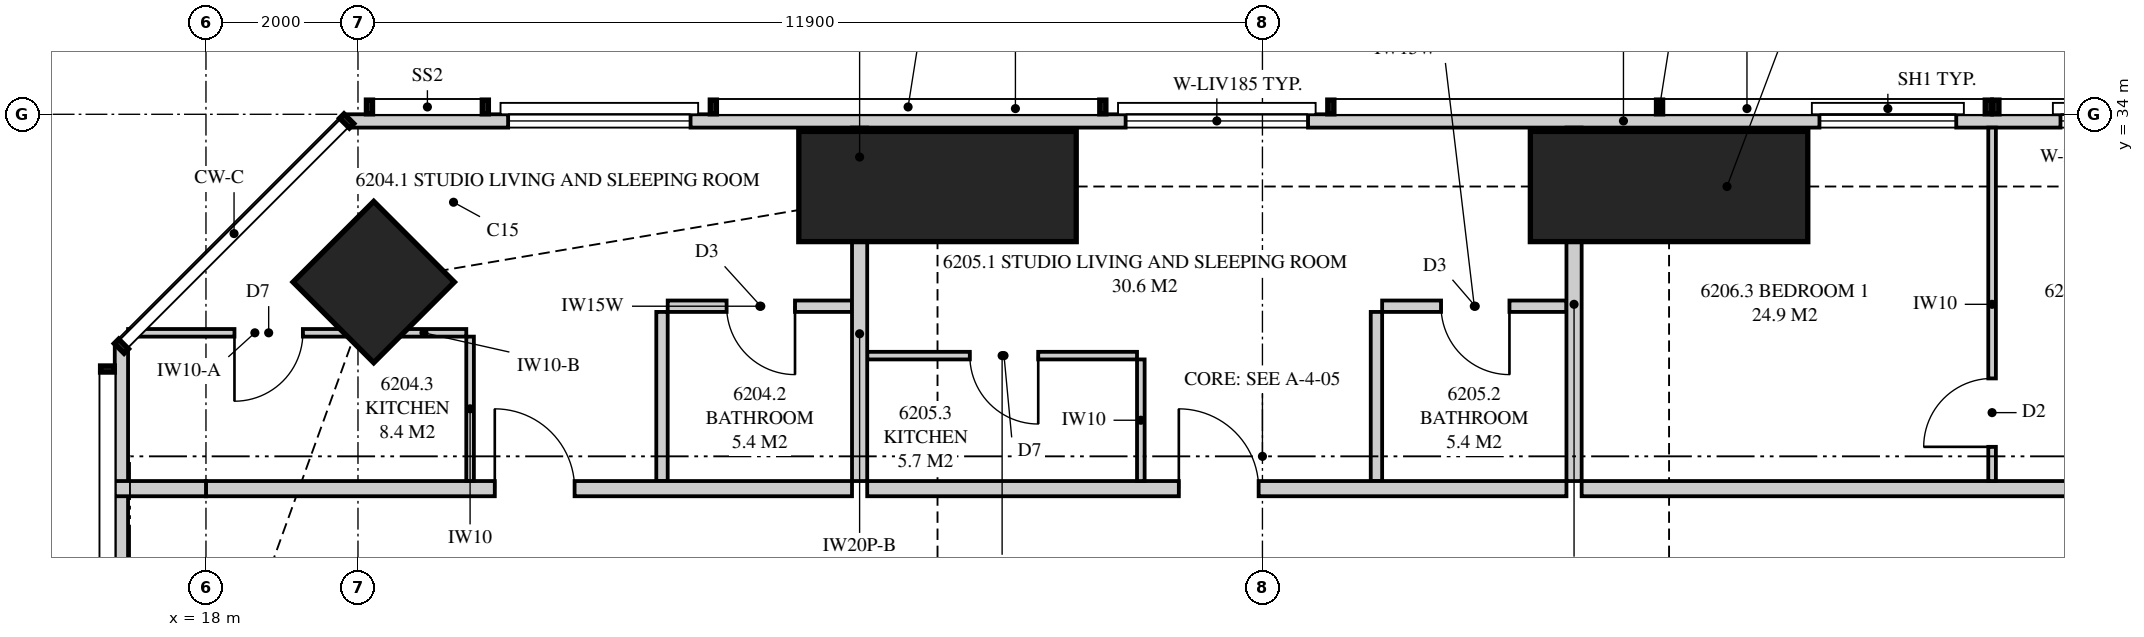
"""IFC4 building model, lengths in metres.
Left out: names, types, materials, properties, quantities, classifications, styles, units other than length and angle.
Written with IfcOpenShell. Run it as: python <this file> out.ifc"""

import sys

from ifc_helpers import new_model, si_unit, direction, frame, frame_2d, origin, origin_2d, place, context, subcontext, project, spatial, polyline, rectangle, outline, extrude, element, fill, save


model = new_model("IFC4")
c1 = context("Model", 3, precision=1e-05, world=origin(), true_north=direction((0.0, 1.0)))
c2 = subcontext(c1, "Body", "Model", "MODEL_VIEW")
j1 = project(units=[si_unit("LENGTHUNIT", "METRE"), si_unit("PLANEANGLEUNIT", "RADIAN")], contexts=[c1])
p1 = place(None, origin())
s1 = spatial("IfcSite", under=j1, at=p1, CompositionType="ELEMENT")
p2 = place(p1, origin())
s2 = spatial("IfcBuilding", under=s1, at=p2, CompositionType="ELEMENT")
p3 = place(p2, frame((0.0, 0.0, 228.45)))
s3 = spatial("IfcBuildingStorey", under=s2, at=p3, CompositionType="ELEMENT", Elevation=228.45)
for number, where, z_axis, x_axis in (
    (1, (37.25, 33.05, 0.0), (0.0, 0.0, 1.0), (0.0, 1.0, 0.0)),
    (2, (27.625, 33.05, 0.0), (0.0, 0.0, 1.0), (0.0, 1.0, 0.0)),
):
    element("IfcColumn", number, at=place(p3, frame(where, z_axis=z_axis, x_axis=x_axis)), inside=s3, PredefinedType="COLUMN", context=c2, shape_type="SweptSolid", body=[
        extrude(rectangle(XDim=1.45, YDim=3.65, at=origin_2d()), origin(), (0.0, 0.0, 1.0), 3.5),
    ])
p4 = place(p3, frame((20.207, 31.793, 0.0), z_axis=(0.0, 0.0, 1.0), x_axis=(0.707106781187, 0.707106781187, 0.0)))
e3 = element("IfcColumn", 3, at=p4, inside=s3, PredefinedType="COLUMN", context=c2, shape_type="SweptSolid", body=[
    extrude(rectangle(XDim=1.5, YDim=1.5, at=origin_2d()), origin(), (0.0, 0.0, 1.0), 3.5),
])
p5 = place(p3, frame((53.449, 33.913, 0.0), z_axis=(0.0, 0.0, 1.0), x_axis=(-1.0, 0.0, 0.0)))
e4 = element("IfcWall", 4, at=p5, inside=s3, PredefinedType="SOLIDWALL", context=c2, shape_type="SweptSolid", body=[
    extrude(outline(polyline([(0.0, 0.0), (33.597, 0.0), (33.597, 3.26), (26.039, 3.26), (26.039, 2.3), (25.955, 2.3), (25.955, 3.26), (25.824, 3.26), (25.824, 2.3), (6.574, 2.3), (6.574, 3.26), (6.442, 3.26), (6.442, 2.3), (6.359, 2.3), (6.359, 3.26), (0.0, 3.26), (0.0, 0.0)])), frame((0.0, 0.087, 0.0), z_axis=(0.0, -1.0, 0.0), x_axis=(1.0, 0.0, 0.0)), (0.0, 0.0, 1.0), 0.175),
])
p6 = place(p5, frame((0.6, 0.0, 0.0)))
e5 = element("IfcOpeningElement", 5, at=p6, cuts=e4, PredefinedType="OPENING", context=c2, shape_type="SweptSolid", body=[
    extrude(rectangle(XDim=1.8, YDim=2.25, at=frame_2d((0.9, 1.125))), frame((0.0, 0.097, 0.0), z_axis=(0.0, -1.0, 0.0), x_axis=(1.0, 0.0, 0.0)), (0.0, 0.0, 1.0), 0.195),
])
p7 = place(p5, frame((2.835, 0.0, 0.4)))
e6 = element("IfcOpeningElement", 6, at=p7, cuts=e4, PredefinedType="OPENING", context=c2, shape_type="SweptSolid", body=[
    extrude(rectangle(XDim=1.8, YDim=1.85, at=frame_2d((0.9, 0.925))), frame((0.0, 0.097, 0.0), z_axis=(0.0, -1.0, 0.0), x_axis=(1.0, 0.0, 0.0)), (0.0, 0.0, 1.0), 0.195),
])
p8 = place(p5, frame((9.249, 0.0, 0.4)))
e7 = element("IfcOpeningElement", 7, at=p8, cuts=e4, PredefinedType="OPENING", context=c2, shape_type="SweptSolid", body=[
    extrude(rectangle(XDim=1.8, YDim=1.85, at=frame_2d((0.9, 0.925))), frame((0.0, 0.097, 0.0), z_axis=(0.0, -1.0, 0.0), x_axis=(1.0, 0.0, 0.0)), (0.0, 0.0, 1.0), 0.195),
])
p9 = place(p5, frame((12.42, 0.0, 0.4)))
e8 = element("IfcOpeningElement", 8, at=p9, cuts=e4, PredefinedType="OPENING", context=c2, shape_type="SweptSolid", body=[
    extrude(rectangle(XDim=1.8, YDim=1.85, at=frame_2d((0.9, 0.925))), frame((0.0, 0.097, 0.0), z_axis=(0.0, -1.0, 0.0), x_axis=(1.0, 0.0, 0.0)), (0.0, 0.0, 1.0), 0.195),
])
p10 = place(p5, frame((20.949, 0.0, 0.4)))
e9 = element("IfcOpeningElement", 9, at=p10, cuts=e4, PredefinedType="OPENING", context=c2, shape_type="SweptSolid", body=[
    extrude(rectangle(XDim=2.4, YDim=1.85, at=frame_2d((1.2, 0.925))), frame((0.0, 0.097, 0.0), z_axis=(0.0, -1.0, 0.0), x_axis=(1.0, 0.0, 0.0)), (0.0, 0.0, 1.0), 0.195),
])
p11 = place(p5, frame((29.073, 0.0, 0.4)))
e10 = element("IfcOpeningElement", 10, at=p11, cuts=e4, PredefinedType="OPENING", context=c2, shape_type="SweptSolid", body=[
    extrude(rectangle(XDim=2.4, YDim=1.85, at=frame_2d((1.2, 0.925))), frame((0.0, 0.097, 0.0), z_axis=(0.0, -1.0, 0.0), x_axis=(1.0, 0.0, 0.0)), (0.0, 0.0, 1.0), 0.195),
])
p12 = place(p3, frame((16.887, 30.949, 0.0), z_axis=(0.0, 0.0, 1.0), x_axis=(0.0, -1.0, 0.0)))
e11 = element("IfcWall", 11, at=p12, inside=s3, PredefinedType="SOLIDWALL", context=c2, shape_type="SweptSolid", body=[
    extrude(outline(polyline([(0.0, 0.0), (27.897, 0.0), (27.897, 3.26), (18.148, 3.26), (18.148, 2.3), (18.125, 2.3), (18.125, 3.26), (17.949, 3.26), (17.949, 2.3), (5.949, 2.3), (5.949, 3.26), (0.0, 3.26), (0.0, 0.0)])), frame((0.0, 0.087, 0.0), z_axis=(0.0, -1.0, 0.0), x_axis=(1.0, 0.0, 0.0)), (0.0, 0.0, 1.0), 0.175),
])
p13 = place(p12, frame((11.849, 0.0, 0.4)))
e12 = element("IfcOpeningElement", 12, at=p13, cuts=e11, PredefinedType="OPENING", context=c2, shape_type="SweptSolid", body=[
    extrude(rectangle(XDim=1.2, YDim=1.85, at=frame_2d((0.6, 0.925))), frame((0.0, 0.097, 0.0), z_axis=(0.0, -1.0, 0.0), x_axis=(1.0, 0.0, 0.0)), (0.0, 0.0, 1.0), 0.195),
])
p14 = place(p3, frame((26.6, 33.825, 0.0), z_axis=(0.0, 0.0, 1.0), x_axis=(0.0, -1.0, 0.0)))
e13 = element("IfcWall", 13, at=p14, inside=s3, PredefinedType="PARTITIONING", context=c2, shape_type="SweptSolid", body=[
    extrude(outline(polyline([(0.026, 2.3), (0.026, 3.26), (0.0, 3.26), (0.0, 0.0), (0.529, 0.0), (0.529, 0.539), (0.775, 0.539), (0.775, 1.761), (0.529, 1.761), (0.529, 2.3), (0.026, 2.3)])), frame((0.0, 0.1, 0.0), z_axis=(0.0, -1.0, 0.0), x_axis=(1.0, 0.0, 0.0)), (0.0, 0.0, 1.0), 0.2),
])
p15 = place(p3, frame((26.6, 33.05, 0.0), z_axis=(0.0, 0.0, 1.0), x_axis=(0.0, -1.0, 0.0)))
e14 = element("IfcWall", 14, at=p15, inside=s3, PredefinedType="PARTITIONING", context=c2, shape_type="SweptSolid", body=[
    extrude(outline(polyline([(0.246, 2.3), (0.246, 1.761), (0.0, 1.761), (0.0, 0.539), (0.246, 0.539), (0.246, 0.0), (3.875, 0.0), (3.875, 2.66), (1.097, 2.66), (1.097, 2.3), (0.246, 2.3)])), frame((0.0, 0.1, 0.0), z_axis=(0.0, -1.0, 0.0), x_axis=(1.0, 0.0, 0.0)), (0.0, 0.0, 1.0), 0.2),
])
p16 = place(p3, frame((18.0, 29.075, 0.0), z_axis=(0.0, 0.0, 1.0), x_axis=(1.0, 0.0, 0.0)))
e15 = element("IfcWall", 15, at=p16, inside=s3, PredefinedType="PARTITIONING", context=c2, shape_type="SweptSolid", body=[
    extrude(outline(polyline([(0.0, 0.0), (8.5, 0.0), (8.5, 3.26), (8.5, 2.66), (8.315, 2.66), (8.315, 3.26), (2.192, 3.26), (2.192, 2.3), (0.256, 2.3), (0.256, 3.26), (0.0, 3.26), (0.0, 0.0)])), frame((0.0, 0.1, 0.0), z_axis=(0.0, -1.0, 0.0), x_axis=(1.0, 0.0, 0.0)), (0.0, 0.0, 1.0), 0.2),
])
p17 = place(p16, frame((3.8, 0.0, 0.0)))
e16 = element("IfcOpeningElement", 16, at=p17, cuts=e15, PredefinedType="OPENING", context=c2, shape_type="SweptSolid", body=[
    extrude(rectangle(XDim=1.05, YDim=2.2, at=frame_2d((0.525, 1.1))), frame((0.0, 0.11, 0.0), z_axis=(0.0, -1.0, 0.0), x_axis=(1.0, 0.0, 0.0)), (0.0, 0.0, 1.0), 0.22),
])
p18 = place(p3, frame((24.075, 31.475, 0.0), z_axis=(0.0, 0.0, 1.0), x_axis=(1.0, 0.0, 0.0)))
e17 = element("IfcWall", 17, at=p18, inside=s3, PredefinedType="PLUMBINGWALL", context=c2, shape_type="SweptSolid", body=[
    extrude(outline(polyline([(0.0, 0.0), (2.425, 0.0), (2.425, 3.26), (2.425, 2.66), (2.265, 2.66), (2.265, 3.26), (0.0, 3.26), (0.0, 0.0)])), frame((0.0, 0.075, 0.0), z_axis=(0.0, -1.0, 0.0), x_axis=(1.0, 0.0, 0.0)), (0.0, 0.0, 1.0), 0.15),
])
p19 = place(p18, frame((0.775, 0.0, 0.0)))
e18 = element("IfcOpeningElement", 18, at=p19, cuts=e17, PredefinedType="OPENING", context=c2, shape_type="SweptSolid", body=[
    extrude(rectangle(XDim=0.9, YDim=2.1, at=frame_2d((0.45, 1.05))), frame((0.0, 0.085, 0.0), z_axis=(0.0, -1.0, 0.0), x_axis=(1.0, 0.0, 0.0)), (0.0, 0.0, 1.0), 0.17),
])
p20 = place(p3, frame((24.0, 31.4, 0.0), z_axis=(0.0, 0.0, 1.0), x_axis=(0.0, -1.0, 0.0)))
e19 = element("IfcWall", 19, at=p20, inside=s3, PredefinedType="PLUMBINGWALL", context=c2, shape_type="SweptSolid", body=[
    extrude(rectangle(XDim=2.225, YDim=0.15, at=frame_2d((1.112, 0.0))), origin(), (0.0, 0.0, 1.0), 3.26),
])
p21 = place(p3, frame((16.975, 31.125, 0.0), z_axis=(0.0, 0.0, 1.0), x_axis=(1.0, 0.0, 0.0)))
e20 = element("IfcWall", 20, at=p21, inside=s3, PredefinedType="PARTITIONING", context=c2, shape_type="SweptSolid", body=[
    extrude(outline(polyline([(0.0, 0.0), (3.337, 0.0), (3.337, 2.3), (2.076, 2.3), (2.076, 3.26), (0.0, 3.26), (0.0, 0.0)])), frame((0.0, 0.05, 0.0), z_axis=(0.0, -1.0, 0.0), x_axis=(1.0, 0.0, 0.0)), (0.0, 0.0, 1.0), 0.1),
])
p22 = place(p21, frame((1.4, 0.0, 0.0)))
e21 = element("IfcOpeningElement", 21, at=p22, cuts=e20, PredefinedType="OPENING", context=c2, shape_type="SweptSolid", body=[
    extrude(rectangle(XDim=0.9, YDim=2.1, at=frame_2d((0.45, 1.05))), frame((0.0, 0.06, 0.0), z_axis=(0.0, -1.0, 0.0), x_axis=(1.0, 0.0, 0.0)), (0.0, 0.0, 1.0), 0.12),
])
p23 = place(p3, frame((20.312, 31.125, 0.0), z_axis=(0.0, 0.0, 1.0), x_axis=(1.0, 0.0, 0.0)))
e22 = element("IfcWall", 22, at=p23, inside=s3, PredefinedType="PARTITIONING", context=c2, shape_type="SweptSolid", body=[
    extrude(rectangle(XDim=1.113, YDim=0.1, at=frame_2d((0.557, 0.0))), origin(), (0.0, 0.0, 1.0), 2.3),
])
p24 = place(p3, frame((21.475, 31.075, 0.0), z_axis=(0.0, 0.0, 1.0), x_axis=(0.0, -1.0, 0.0)))
e23 = element("IfcWall", 23, at=p24, inside=s3, PredefinedType="PARTITIONING", context=c2, shape_type="SweptSolid", body=[
    extrude(rectangle(XDim=1.9, YDim=0.1, at=frame_2d((0.95, 0.0))), origin(), (0.0, 0.0, 1.0), 3.26),
])
p25 = place(p3, frame((36.0, 33.825, 0.0), z_axis=(0.0, 0.0, 1.0), x_axis=(0.0, -1.0, 0.0)))
e24 = element("IfcWall", 24, at=p25, inside=s3, PredefinedType="PARTITIONING", context=c2, shape_type="SweptSolid", body=[
    extrude(outline(polyline([(0.529, 2.3), (0.0, 2.3), (0.0, 0.0), (0.529, 0.0), (0.529, 0.281), (1.021, 0.281), (1.021, 0.0), (4.65, 0.0), (4.65, 2.66), (1.685, 2.66), (1.685, 2.3), (1.021, 2.3), (1.021, 2.019), (0.529, 2.019), (0.529, 2.3)])), frame((0.0, 0.1, 0.0), z_axis=(0.0, -1.0, 0.0), x_axis=(1.0, 0.0, 0.0)), (0.0, 0.0, 1.0), 0.2),
])
p26 = place(p3, frame((26.7, 29.075, 0.0), z_axis=(0.0, 0.0, 1.0), x_axis=(1.0, 0.0, 0.0)))
e25 = element("IfcWall", 25, at=p26, inside=s3, PredefinedType="PARTITIONING", context=c2, shape_type="SweptSolid", body=[
    extrude(outline(polyline([(0.0, 0.0), (9.2, 0.0), (9.2, 3.26), (2.235, 3.26), (2.235, 2.66), (0.0, 2.66), (0.0, 3.26), (0.0, 0.0)])), frame((0.0, 0.1, 0.0), z_axis=(0.0, -1.0, 0.0), x_axis=(1.0, 0.0, 0.0)), (0.0, 0.0, 1.0), 0.2),
])
p27 = place(p26, frame((4.1, 0.0, 0.0)))
e26 = element("IfcOpeningElement", 26, at=p27, cuts=e25, PredefinedType="OPENING", context=c2, shape_type="SweptSolid", body=[
    extrude(rectangle(XDim=1.05, YDim=2.2, at=frame_2d((0.525, 1.1))), frame((0.0, 0.11, 0.0), z_axis=(0.0, -1.0, 0.0), x_axis=(1.0, 0.0, 0.0)), (0.0, 0.0, 1.0), 0.22),
])
p28 = place(p3, frame((33.475, 31.475, 0.0), z_axis=(0.0, 0.0, 1.0), x_axis=(1.0, 0.0, 0.0)))
e27 = element("IfcWall", 27, at=p28, inside=s3, PredefinedType="PLUMBINGWALL", context=c2, shape_type="SweptSolid", body=[
    extrude(rectangle(XDim=2.425, YDim=0.15, at=frame_2d((1.212, 0.0))), origin(), (0.0, 0.0, 1.0), 3.26),
])
p29 = place(p28, frame((0.775, 0.0, 0.0)))
e28 = element("IfcOpeningElement", 28, at=p29, cuts=e27, PredefinedType="OPENING", context=c2, shape_type="SweptSolid", body=[
    extrude(rectangle(XDim=0.9, YDim=2.1, at=frame_2d((0.45, 1.05))), frame((0.0, 0.085, 0.0), z_axis=(0.0, -1.0, 0.0), x_axis=(1.0, 0.0, 0.0)), (0.0, 0.0, 1.0), 0.17),
])
p30 = place(p3, frame((33.4, 31.4, 0.0), z_axis=(0.0, 0.0, 1.0), x_axis=(0.0, -1.0, 0.0)))
e29 = element("IfcWall", 29, at=p30, inside=s3, PredefinedType="PLUMBINGWALL", context=c2, shape_type="SweptSolid", body=[
    extrude(rectangle(XDim=2.225, YDim=0.15, at=frame_2d((1.112, 0.0))), origin(), (0.0, 0.0, 1.0), 3.26),
])
p31 = place(p3, frame((26.7, 30.825, 0.0), z_axis=(0.0, 0.0, 1.0), x_axis=(1.0, 0.0, 0.0)))
e30 = element("IfcWall", 30, at=p31, inside=s3, PredefinedType="PARTITIONING", context=c2, shape_type="SweptSolid", body=[
    extrude(outline(polyline([(0.0, 0.0), (3.55, 0.0), (3.55, 3.26), (2.185, 3.26), (2.185, 2.66), (0.0, 2.66), (0.0, 3.26), (0.0, 0.0)])), frame((0.0, 0.05, 0.0), z_axis=(0.0, -1.0, 0.0), x_axis=(1.0, 0.0, 0.0)), (0.0, 0.0, 1.0), 0.1),
])
p32 = place(p31, frame((1.35, 0.0, 0.0)))
e31 = element("IfcOpeningElement", 31, at=p32, cuts=e30, PredefinedType="OPENING", context=c2, shape_type="SweptSolid", body=[
    extrude(rectangle(XDim=0.9, YDim=2.1, at=frame_2d((0.45, 1.05))), frame((0.0, 0.06, 0.0), z_axis=(0.0, -1.0, 0.0), x_axis=(1.0, 0.0, 0.0)), (0.0, 0.0, 1.0), 0.12),
])
p33 = place(p3, frame((30.3, 30.775, 0.0), z_axis=(0.0, 0.0, 1.0), x_axis=(0.0, -1.0, 0.0)))
e32 = element("IfcWall", 32, at=p33, inside=s3, PredefinedType="PARTITIONING", context=c2, shape_type="SweptSolid", body=[
    extrude(rectangle(XDim=1.6, YDim=0.1, at=frame_2d((0.8, 0.0))), origin(), (0.0, 0.0, 1.0), 3.26),
])
p34 = place(p3, frame((36.1, 29.075, 0.0), z_axis=(0.0, 0.0, 1.0), x_axis=(1.0, 0.0, 0.0)))
e33 = element("IfcWall", 33, at=p34, inside=s3, PredefinedType="PARTITIONING", context=c2, shape_type="SweptSolid", body=[
    extrude(outline(polyline([(0.0, 0.0), (20.225, 0.0), (20.225, 3.26), (19.621, 3.26), (19.621, 2.3), (17.771, 2.3), (17.771, 3.26), (12.085, 3.26), (12.085, 2.66), (9.465, 2.66), (9.465, 3.26), (2.46, 3.26), (2.46, 2.66), (0.0, 2.66), (0.0, 3.26), (0.0, 0.0)])), frame((0.0, 0.1, 0.0), z_axis=(0.0, -1.0, 0.0), x_axis=(1.0, 0.0, 0.0)), (0.0, 0.0, 1.0), 0.2),
])
p35 = place(p34, frame((9.65, 0.0, 0.0)))
e34 = element("IfcOpeningElement", 34, at=p35, cuts=e33, PredefinedType="OPENING", context=c2, shape_type="SweptSolid", body=[
    extrude(rectangle(XDim=1.05, YDim=2.2, at=frame_2d((0.525, 1.1))), frame((0.0, 0.11, 0.0), z_axis=(0.0, -1.0, 0.0), x_axis=(1.0, 0.0, 0.0)), (0.0, 0.0, 1.0), 0.22),
])
p36 = place(p3, frame((41.5, 33.825, 0.0), z_axis=(0.0, 0.0, 1.0), x_axis=(0.0, -1.0, 0.0)))
e35 = element("IfcWall", 35, at=p36, inside=s3, PredefinedType="PARTITIONING", context=c2, shape_type="SweptSolid", body=[
    extrude(outline(polyline([(0.0, 0.0), (4.65, 0.0), (4.65, 3.26), (1.635, 3.26), (1.635, 2.3), (0.0, 2.3), (0.0, 3.26), (0.0, 0.0)])), frame((0.0, 0.05, 0.0), z_axis=(0.0, -1.0, 0.0), x_axis=(1.0, 0.0, 0.0)), (0.0, 0.0, 1.0), 0.1),
])
p37 = place(p36, frame((3.3, 0.0, 0.0)))
e36 = element("IfcOpeningElement", 36, at=p37, cuts=e35, PredefinedType="OPENING", context=c2, shape_type="SweptSolid", body=[
    extrude(rectangle(XDim=0.9, YDim=2.1, at=frame_2d((0.45, 1.05))), frame((0.0, 0.06, 0.0), z_axis=(0.0, -1.0, 0.0), x_axis=(1.0, 0.0, 0.0)), (0.0, 0.0, 1.0), 0.12),
])
p38 = place(p3, frame((16.8, 29.075, 0.0), z_axis=(0.0, 0.0, 1.0), x_axis=(1.0, 0.0, 0.0)))
e37 = element("IfcWall", 37, at=p38, inside=s3, PredefinedType="PARTITIONING", context=c2, shape_type="SweptSolid", body=[
    extrude(rectangle(XDim=1.2, YDim=0.2, at=frame_2d((0.6, 0.0))), origin(), (0.0, 0.0, 1.0), 3.26),
])
p39 = place(p8, origin())
e38 = element("IfcWindow", 38, at=p39, inside=s3, PartitioningType="SINGLE_PANEL", PredefinedType="WINDOW", context=c2, shape_type="SweptSolid", body=[
    extrude(rectangle(XDim=1.8, YDim=1.85, at=frame_2d((0.9, 0.925))), frame((0.0, 0.03, 0.0), z_axis=(0.0, -1.0, 0.0), x_axis=(1.0, 0.0, 0.0)), (0.0, 0.0, 1.0), 0.06),
])
fill(e7, e38)
p40 = place(p9, origin())
e39 = element("IfcWindow", 39, at=p40, inside=s3, PartitioningType="SINGLE_PANEL", PredefinedType="WINDOW", context=c2, shape_type="SweptSolid", body=[
    extrude(rectangle(XDim=1.8, YDim=1.85, at=frame_2d((0.9, 0.925))), frame((0.0, 0.03, 0.0), z_axis=(0.0, -1.0, 0.0), x_axis=(1.0, 0.0, 0.0)), (0.0, 0.0, 1.0), 0.06),
])
fill(e8, e39)
p41 = place(p10, origin())
e40 = element("IfcWindow", 40, at=p41, inside=s3, PartitioningType="SINGLE_PANEL", PredefinedType="WINDOW", context=c2, shape_type="SweptSolid", body=[
    extrude(rectangle(XDim=2.4, YDim=1.85, at=frame_2d((1.2, 0.925))), frame((0.0, 0.03, 0.0), z_axis=(0.0, -1.0, 0.0), x_axis=(1.0, 0.0, 0.0)), (0.0, 0.0, 1.0), 0.06),
])
fill(e9, e40)
p42 = place(p11, origin())
e41 = element("IfcWindow", 41, at=p42, inside=s3, PartitioningType="SINGLE_PANEL", PredefinedType="WINDOW", context=c2, shape_type="SweptSolid", body=[
    extrude(rectangle(XDim=2.4, YDim=1.85, at=frame_2d((1.2, 0.925))), frame((0.0, 0.03, 0.0), z_axis=(0.0, -1.0, 0.0), x_axis=(1.0, 0.0, 0.0)), (0.0, 0.0, 1.0), 0.06),
])
fill(e10, e41)
p43 = place(p17, origin())
e42 = element("IfcDoor", 42, at=p43, inside=s3, OperationType="SINGLE_SWING_LEFT", PredefinedType="DOOR", context=c2, shape_type="SweptSolid", body=[
    extrude(rectangle(XDim=1.05, YDim=2.2, at=frame_2d((0.525, 1.1))), frame((0.0, 0.025, 0.0), z_axis=(0.0, -1.0, 0.0), x_axis=(1.0, 0.0, 0.0)), (0.0, 0.0, 1.0), 0.05),
])
fill(e16, e42)
p44 = place(p19, frame((0.9, 0.0, 0.0), z_axis=(0.0, 0.0, 1.0), x_axis=(-1.0, 0.0, 0.0)))
e43 = element("IfcDoor", 43, at=p44, inside=s3, OperationType="SINGLE_SWING_LEFT", PredefinedType="DOOR", context=c2, shape_type="SweptSolid", body=[
    extrude(rectangle(XDim=0.9, YDim=2.1, at=frame_2d((0.45, 1.05))), frame((0.0, 0.025, 0.0), z_axis=(0.0, -1.0, 0.0), x_axis=(1.0, 0.0, 0.0)), (0.0, 0.0, 1.0), 0.05),
])
fill(e18, e43)
p45 = place(p22, frame((0.9, 0.0, 0.0), z_axis=(0.0, 0.0, 1.0), x_axis=(-1.0, 0.0, 0.0)))
e44 = element("IfcDoor", 44, at=p45, inside=s3, OperationType="SINGLE_SWING_RIGHT", PredefinedType="DOOR", context=c2, shape_type="SweptSolid", body=[
    extrude(rectangle(XDim=0.9, YDim=2.1, at=frame_2d((0.45, 1.05))), frame((0.0, 0.025, 0.0), z_axis=(0.0, -1.0, 0.0), x_axis=(1.0, 0.0, 0.0)), (0.0, 0.0, 1.0), 0.05),
])
fill(e21, e44)
p46 = place(p27, origin())
e45 = element("IfcDoor", 45, at=p46, inside=s3, OperationType="SINGLE_SWING_LEFT", PredefinedType="DOOR", context=c2, shape_type="SweptSolid", body=[
    extrude(rectangle(XDim=1.05, YDim=2.2, at=frame_2d((0.525, 1.1))), frame((0.0, 0.025, 0.0), z_axis=(0.0, -1.0, 0.0), x_axis=(1.0, 0.0, 0.0)), (0.0, 0.0, 1.0), 0.05),
])
fill(e26, e45)
p47 = place(p29, frame((0.9, 0.0, 0.0), z_axis=(0.0, 0.0, 1.0), x_axis=(-1.0, 0.0, 0.0)))
e46 = element("IfcDoor", 46, at=p47, inside=s3, OperationType="SINGLE_SWING_LEFT", PredefinedType="DOOR", context=c2, shape_type="SweptSolid", body=[
    extrude(rectangle(XDim=0.9, YDim=2.1, at=frame_2d((0.45, 1.05))), frame((0.0, 0.025, 0.0), z_axis=(0.0, -1.0, 0.0), x_axis=(1.0, 0.0, 0.0)), (0.0, 0.0, 1.0), 0.05),
])
fill(e28, e46)
p48 = place(p32, frame((0.9, 0.0, 0.0), z_axis=(0.0, 0.0, 1.0), x_axis=(-1.0, 0.0, 0.0)))
e47 = element("IfcDoor", 47, at=p48, inside=s3, OperationType="SINGLE_SWING_LEFT", PredefinedType="DOOR", context=c2, shape_type="SweptSolid", body=[
    extrude(rectangle(XDim=0.9, YDim=2.1, at=frame_2d((0.45, 1.05))), frame((0.0, 0.025, 0.0), z_axis=(0.0, -1.0, 0.0), x_axis=(1.0, 0.0, 0.0)), (0.0, 0.0, 1.0), 0.05),
])
fill(e31, e47)
p49 = place(p37, frame((0.9, 0.0, 0.0), z_axis=(0.0, 0.0, 1.0), x_axis=(-1.0, 0.0, 0.0)))
e48 = element("IfcDoor", 48, at=p49, inside=s3, OperationType="SINGLE_SWING_LEFT", PredefinedType="DOOR", context=c2, shape_type="SweptSolid", body=[
    extrude(rectangle(XDim=0.9, YDim=2.1, at=frame_2d((0.45, 1.05))), frame((0.0, 0.025, 0.0), z_axis=(0.0, -1.0, 0.0), x_axis=(1.0, 0.0, 0.0)), (0.0, 0.0, 1.0), 0.05),
])
fill(e36, e48)
save(model, sys.argv[1])
